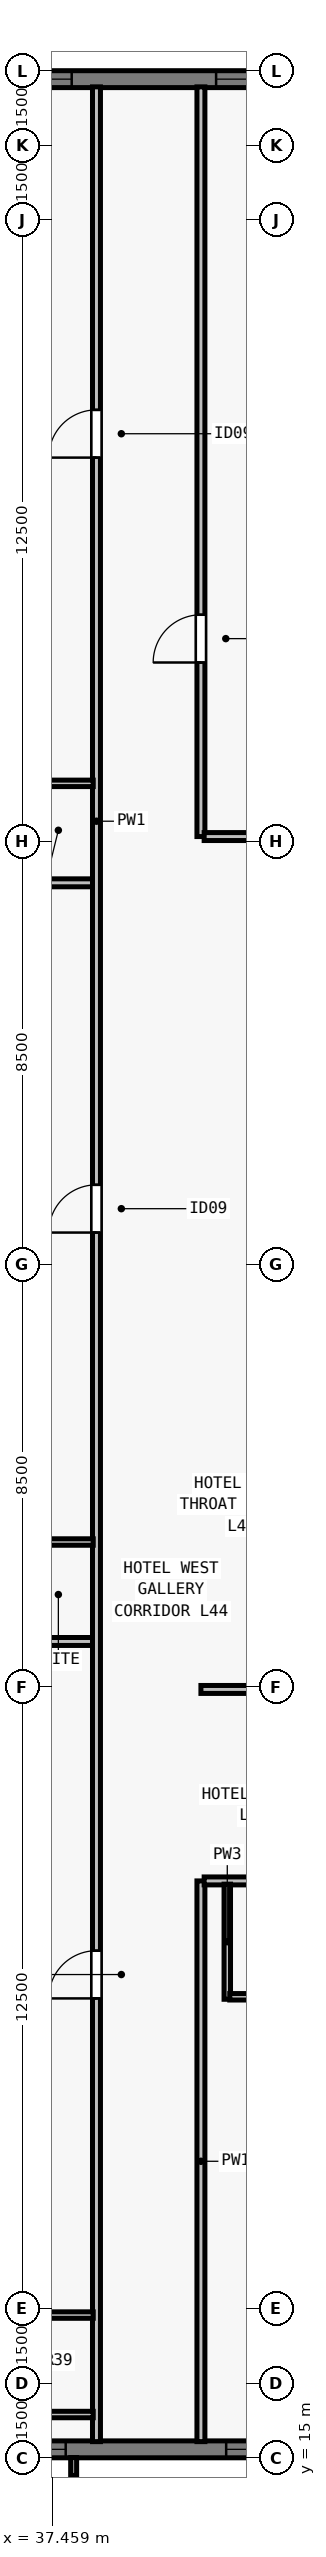
"""IFC4 building model, lengths in metres.
Left out: names, types, materials, properties, quantities, classifications, styles, units other than length and angle.
Written with IfcOpenShell. Run it as: python <this file> out.ifc"""

import sys

from ifc_helpers import new_model, si_unit, direction, frame, frame_2d, origin, place, context, subcontext, project, spatial, rectangle, extrude, element, fill, save


model = new_model("IFC4")
c1 = context("Model", 3, precision=1e-05, world=origin(), true_north=direction((0.0, 1.0)))
c2 = subcontext(c1, "Body", "Model", "MODEL_VIEW")
j1 = project(units=[si_unit("LENGTHUNIT", "METRE"), si_unit("PLANEANGLEUNIT", "RADIAN")], contexts=[c1])
p1 = place(None, origin())
s1 = spatial("IfcSite", under=j1, at=p1, CompositionType="ELEMENT")
p2 = place(p1, origin())
s2 = spatial("IfcBuilding", under=s1, at=p2, CompositionType="ELEMENT")
p3 = place(p2, frame((0.0, 0.0, 162.0)))
s3 = spatial("IfcBuildingStorey", under=s2, at=p3, CompositionType="ELEMENT", Elevation=162.0)
p4 = place(p3, frame((57.4, 15.17, 0.0), z_axis=(0.0, 0.0, 1.0), x_axis=(-1.0, 0.0, 0.0)))
e1 = element("IfcWall", 1, at=p4, inside=s3, PredefinedType="SOLIDWALL", context=c2, shape_type="SweptSolid", body=[
    extrude(rectangle(XDim=25.082, YDim=0.34, at=frame_2d((12.541, 0.0))), origin(), (0.0, 0.0, 1.0), 3.28),
])
p5 = place(p4, frame((4.913, 0.0, 0.8)))
e2 = element("IfcOpeningElement", 2, at=p5, cuts=e1, PredefinedType="OPENING", context=c2, shape_type="SweptSolid", body=[
    extrude(rectangle(XDim=1.35, YDim=1.66, at=frame_2d((0.675, 0.83))), frame((0.0, 0.18, 0.0), z_axis=(0.0, -1.0, 0.0), x_axis=(1.0, 0.0, 0.0)), (0.0, 0.0, 1.0), 0.36),
])
p6 = place(p4, frame((12.716, 0.0, 0.8)))
e3 = element("IfcOpeningElement", 3, at=p6, cuts=e1, PredefinedType="OPENING", context=c2, shape_type="SweptSolid", body=[
    extrude(rectangle(XDim=1.35, YDim=1.66, at=frame_2d((0.675, 0.83))), frame((0.0, 0.18, 0.0), z_axis=(0.0, -1.0, 0.0), x_axis=(1.0, 0.0, 0.0)), (0.0, 0.0, 1.0), 0.36),
])
p7 = place(p4, frame((14.692, 0.0, 0.8)))
e4 = element("IfcOpeningElement", 4, at=p7, cuts=e1, PredefinedType="OPENING", context=c2, shape_type="SweptSolid", body=[
    extrude(rectangle(XDim=1.75, YDim=1.66, at=frame_2d((0.875, 0.83))), frame((0.0, 0.18, 0.0), z_axis=(0.0, -1.0, 0.0), x_axis=(1.0, 0.0, 0.0)), (0.0, 0.0, 1.0), 0.36),
])
p8 = place(p4, frame((19.669, 0.0, 0.8)))
e5 = element("IfcOpeningElement", 5, at=p8, cuts=e1, PredefinedType="OPENING", context=c2, shape_type="SweptSolid", body=[
    extrude(rectangle(XDim=1.35, YDim=1.66, at=frame_2d((0.675, 0.83))), frame((0.0, 0.18, 0.0), z_axis=(0.0, -1.0, 0.0), x_axis=(1.0, 0.0, 0.0)), (0.0, 0.0, 1.0), 0.36),
])
p9 = place(p4, frame((8.71, 0.0, 0.8)))
e6 = element("IfcOpeningElement", 6, at=p9, cuts=e1, PredefinedType="OPENING", context=c2, shape_type="SweptSolid", body=[
    extrude(rectangle(XDim=0.75, YDim=1.66, at=frame_2d((0.375, 0.83))), frame((0.0, 0.18, 0.0), z_axis=(0.0, -1.0, 0.0), x_axis=(1.0, 0.0, 0.0)), (0.0, 0.0, 1.0), 0.36),
])
p10 = place(p4, frame((1.27, 0.0, 0.8)))
e7 = element("IfcOpeningElement", 7, at=p10, cuts=e1, PredefinedType="OPENING", context=c2, shape_type="SweptSolid", body=[
    extrude(rectangle(XDim=0.9, YDim=1.66, at=frame_2d((0.45, 0.83))), frame((0.0, 0.18, 0.0), z_axis=(0.0, -1.0, 0.0), x_axis=(1.0, 0.0, 0.0)), (0.0, 0.0, 1.0), 0.36),
])
p11 = place(p3, frame((32.0, 62.83, 0.0), z_axis=(0.0, 0.0, 1.0), x_axis=(1.0, 0.0, 0.0)))
e8 = element("IfcWall", 8, at=p11, inside=s3, PredefinedType="SOLIDWALL", context=c2, shape_type="SweptSolid", body=[
    extrude(rectangle(XDim=39.682, YDim=0.34, at=frame_2d((19.841, 0.0))), origin(), (0.0, 0.0, 1.0), 3.28),
])
p12 = place(p11, frame((4.502, 0.0, 0.8)))
e9 = element("IfcOpeningElement", 9, at=p12, cuts=e8, PredefinedType="OPENING", context=c2, shape_type="SweptSolid", body=[
    extrude(rectangle(XDim=1.35, YDim=1.66, at=frame_2d((0.675, 0.83))), frame((0.0, 0.18, 0.0), z_axis=(0.0, -1.0, 0.0), x_axis=(1.0, 0.0, 0.0)), (0.0, 0.0, 1.0), 0.36),
])
p13 = place(p11, frame((8.755, 0.0, 0.8)))
e10 = element("IfcOpeningElement", 10, at=p13, cuts=e8, PredefinedType="OPENING", context=c2, shape_type="SweptSolid", body=[
    extrude(rectangle(XDim=1.75, YDim=1.66, at=frame_2d((0.875, 0.83))), frame((0.0, 0.18, 0.0), z_axis=(0.0, -1.0, 0.0), x_axis=(1.0, 0.0, 0.0)), (0.0, 0.0, 1.0), 0.36),
])
p14 = place(p11, frame((12.059, 0.0, 0.8)))
e11 = element("IfcOpeningElement", 11, at=p14, cuts=e8, PredefinedType="OPENING", context=c2, shape_type="SweptSolid", body=[
    extrude(rectangle(XDim=1.35, YDim=1.66, at=frame_2d((0.675, 0.83))), frame((0.0, 0.18, 0.0), z_axis=(0.0, -1.0, 0.0), x_axis=(1.0, 0.0, 0.0)), (0.0, 0.0, 1.0), 0.36),
])
p15 = place(p11, frame((16.262, 0.0, 0.8)))
e12 = element("IfcOpeningElement", 12, at=p15, cuts=e8, PredefinedType="OPENING", context=c2, shape_type="SweptSolid", body=[
    extrude(rectangle(XDim=1.75, YDim=1.66, at=frame_2d((0.875, 0.83))), frame((0.0, 0.18, 0.0), z_axis=(0.0, -1.0, 0.0), x_axis=(1.0, 0.0, 0.0)), (0.0, 0.0, 1.0), 0.36),
])
p16 = place(p11, frame((19.166, 0.0, 0.8)))
e13 = element("IfcOpeningElement", 13, at=p16, cuts=e8, PredefinedType="OPENING", context=c2, shape_type="SweptSolid", body=[
    extrude(rectangle(XDim=1.35, YDim=1.66, at=frame_2d((0.675, 0.83))), frame((0.0, 0.18, 0.0), z_axis=(0.0, -1.0, 0.0), x_axis=(1.0, 0.0, 0.0)), (0.0, 0.0, 1.0), 0.36),
])
p17 = place(p11, frame((22.07, 0.0, 0.8)))
e14 = element("IfcOpeningElement", 14, at=p17, cuts=e8, PredefinedType="OPENING", context=c2, shape_type="SweptSolid", body=[
    extrude(rectangle(XDim=1.75, YDim=1.66, at=frame_2d((0.875, 0.83))), frame((0.0, 0.18, 0.0), z_axis=(0.0, -1.0, 0.0), x_axis=(1.0, 0.0, 0.0)), (0.0, 0.0, 1.0), 0.36),
])
p18 = place(p11, frame((26.273, 0.0, 0.8)))
e15 = element("IfcOpeningElement", 15, at=p18, cuts=e8, PredefinedType="OPENING", context=c2, shape_type="SweptSolid", body=[
    extrude(rectangle(XDim=1.35, YDim=1.66, at=frame_2d((0.675, 0.83))), frame((0.0, 0.18, 0.0), z_axis=(0.0, -1.0, 0.0), x_axis=(1.0, 0.0, 0.0)), (0.0, 0.0, 1.0), 0.36),
])
p19 = place(p11, frame((28.377, 0.0, 0.8)))
e16 = element("IfcOpeningElement", 16, at=p19, cuts=e8, PredefinedType="OPENING", context=c2, shape_type="SweptSolid", body=[
    extrude(rectangle(XDim=1.75, YDim=1.66, at=frame_2d((0.875, 0.83))), frame((0.0, 0.18, 0.0), z_axis=(0.0, -1.0, 0.0), x_axis=(1.0, 0.0, 0.0)), (0.0, 0.0, 1.0), 0.36),
])
p20 = place(p11, frame((33.38, 0.0, 0.8)))
e17 = element("IfcOpeningElement", 17, at=p20, cuts=e8, PredefinedType="OPENING", context=c2, shape_type="SweptSolid", body=[
    extrude(rectangle(XDim=1.35, YDim=1.66, at=frame_2d((0.675, 0.83))), frame((0.0, 0.18, 0.0), z_axis=(0.0, -1.0, 0.0), x_axis=(1.0, 0.0, 0.0)), (0.0, 0.0, 1.0), 0.36),
])
p21 = place(p3, frame((38.35, 15.325, 0.0), z_axis=(0.0, 0.0, 1.0), x_axis=(0.0, 1.0, 0.0)))
e18 = element("IfcWall", 18, at=p21, inside=s3, PredefinedType="PARTITIONING", context=c2, shape_type="SweptSolid", body=[
    extrude(rectangle(XDim=47.35, YDim=0.16, at=frame_2d((23.675, 0.0))), origin(), (0.0, 0.0, 1.0), 2.555),
])
p22 = place(p21, frame((8.912, 0.0, 0.0)))
e19 = element("IfcOpeningElement", 19, at=p22, cuts=e18, PredefinedType="OPENING", context=c2, shape_type="SweptSolid", body=[
    extrude(rectangle(XDim=0.96, YDim=2.15, at=frame_2d((0.48, 1.075))), frame((0.0, 0.09, 0.0), z_axis=(0.0, -1.0, 0.0), x_axis=(1.0, 0.0, 0.0)), (0.0, 0.0, 1.0), 0.18),
])
p23 = place(p21, frame((24.312, 0.0, 0.0)))
e20 = element("IfcOpeningElement", 20, at=p23, cuts=e18, PredefinedType="OPENING", context=c2, shape_type="SweptSolid", body=[
    extrude(rectangle(XDim=0.96, YDim=2.15, at=frame_2d((0.48, 1.075))), frame((0.0, 0.09, 0.0), z_axis=(0.0, -1.0, 0.0), x_axis=(1.0, 0.0, 0.0)), (0.0, 0.0, 1.0), 0.18),
])
p24 = place(p21, frame((39.895, 0.0, 0.0)))
e21 = element("IfcOpeningElement", 21, at=p24, cuts=e18, PredefinedType="OPENING", context=c2, shape_type="SweptSolid", body=[
    extrude(rectangle(XDim=0.96, YDim=2.15, at=frame_2d((0.48, 1.075))), frame((0.0, 0.09, 0.0), z_axis=(0.0, -1.0, 0.0), x_axis=(1.0, 0.0, 0.0)), (0.0, 0.0, 1.0), 0.18),
])
p25 = place(p3, frame((40.45, 15.325, 0.0), z_axis=(0.0, 0.0, 1.0), x_axis=(0.0, 1.0, 0.0)))
e22 = element("IfcWall", 22, at=p25, inside=s3, PredefinedType="PARTITIONING", context=c2, shape_type="SweptSolid", body=[
    extrude(rectangle(XDim=11.275, YDim=0.16, at=frame_2d((5.638, 0.0))), origin(), (0.0, 0.0, 1.0), 2.555),
])
p26 = place(p3, frame((40.45, 47.6, 0.0), z_axis=(0.0, 0.0, 1.0), x_axis=(0.0, 1.0, 0.0)))
e23 = element("IfcWall", 23, at=p26, inside=s3, PredefinedType="PARTITIONING", context=c2, shape_type="SweptSolid", body=[
    extrude(rectangle(XDim=15.075, YDim=0.16, at=frame_2d((7.538, 0.0))), origin(), (0.0, 0.0, 1.0), 2.555),
])
p27 = place(p26, frame((3.5, 0.0, 0.0)))
e24 = element("IfcOpeningElement", 24, at=p27, cuts=e23, PredefinedType="OPENING", context=c2, shape_type="SweptSolid", body=[
    extrude(rectangle(XDim=0.96, YDim=2.12, at=frame_2d((0.48, 1.06))), frame((0.0, 0.09, 0.0), z_axis=(0.0, -1.0, 0.0), x_axis=(1.0, 0.0, 0.0)), (0.0, 0.0, 1.0), 0.18),
])
p28 = place(p3, frame((40.45, 30.45, 0.0), z_axis=(0.0, 0.0, 1.0), x_axis=(1.0, 0.0, 0.0)))
e25 = element("IfcWall", 25, at=p28, inside=s3, PredefinedType="PARTITIONING", context=c2, shape_type="SweptSolid", body=[
    extrude(rectangle(XDim=2.785, YDim=0.16, at=frame_2d((1.393, 0.0))), origin(), (0.0, 0.0, 1.0), 3.28),
])
p29 = place(p3, frame((40.515, 47.6, 0.0), z_axis=(0.0, 0.0, 1.0), x_axis=(1.0, 0.0, 0.0)))
e26 = element("IfcWall", 26, at=p29, inside=s3, PredefinedType="PARTITIONING", context=c2, shape_type="SweptSolid", body=[
    extrude(rectangle(XDim=2.72, YDim=0.16, at=frame_2d((1.36, 0.0))), origin(), (0.0, 0.0, 1.0), 3.28),
])
p30 = place(p3, frame((40.515, 26.6, 0.0), z_axis=(0.0, 0.0, 1.0), x_axis=(1.0, 0.0, 0.0)))
e27 = element("IfcWall", 27, at=p30, inside=s3, PredefinedType="PARTITIONING", context=c2, shape_type="SweptSolid", body=[
    extrude(rectangle(XDim=22.07, YDim=0.16, at=frame_2d((11.035, 0.0))), origin(), (0.0, 0.0, 1.0), 3.28),
])
p31 = place(p30, frame((3.072, 0.0, 0.0)))
e28 = element("IfcOpeningElement", 28, at=p31, cuts=e27, PredefinedType="OPENING", context=c2, shape_type="SweptSolid", body=[
    extrude(rectangle(XDim=0.96, YDim=2.15, at=frame_2d((0.48, 1.075))), frame((0.0, 0.09, 0.0), z_axis=(0.0, -1.0, 0.0), x_axis=(1.0, 0.0, 0.0)), (0.0, 0.0, 1.0), 0.18),
])
p32 = place(p30, frame((5.362, 0.0, 0.0)))
e29 = element("IfcOpeningElement", 29, at=p32, cuts=e27, PredefinedType="OPENING", context=c2, shape_type="SweptSolid", body=[
    extrude(rectangle(XDim=0.96, YDim=2.15, at=frame_2d((0.48, 1.075))), frame((0.0, 0.09, 0.0), z_axis=(0.0, -1.0, 0.0), x_axis=(1.0, 0.0, 0.0)), (0.0, 0.0, 1.0), 0.18),
])
p33 = place(p30, frame((11.566, 0.0, 0.0)))
e30 = element("IfcOpeningElement", 30, at=p33, cuts=e27, PredefinedType="OPENING", context=c2, shape_type="SweptSolid", body=[
    extrude(rectangle(XDim=0.96, YDim=2.15, at=frame_2d((0.48, 1.075))), frame((0.0, 0.09, 0.0), z_axis=(0.0, -1.0, 0.0), x_axis=(1.0, 0.0, 0.0)), (0.0, 0.0, 1.0), 0.18),
])
p34 = place(p30, frame((14.178, 0.0, 0.0)))
e31 = element("IfcOpeningElement", 31, at=p34, cuts=e27, PredefinedType="OPENING", context=c2, shape_type="SweptSolid", body=[
    extrude(rectangle(XDim=0.96, YDim=2.15, at=frame_2d((0.48, 1.075))), frame((0.0, 0.09, 0.0), z_axis=(0.0, -1.0, 0.0), x_axis=(1.0, 0.0, 0.0)), (0.0, 0.0, 1.0), 0.18),
])
p35 = place(p30, frame((20.099, 0.0, 0.0)))
e32 = element("IfcOpeningElement", 32, at=p35, cuts=e27, PredefinedType="OPENING", context=c2, shape_type="SweptSolid", body=[
    extrude(rectangle(XDim=0.96, YDim=2.15, at=frame_2d((0.48, 1.075))), frame((0.0, 0.09, 0.0), z_axis=(0.0, -1.0, 0.0), x_axis=(1.0, 0.0, 0.0)), (0.0, 0.0, 1.0), 0.18),
])
p36 = place(p3, frame((40.98, 24.22, 0.0), z_axis=(0.0, 0.0, 1.0), x_axis=(0.0, 1.0, 0.0)))
e33 = element("IfcWall", 33, at=p36, inside=s3, PredefinedType="PLUMBINGWALL", context=c2, shape_type="SweptSolid", body=[
    extrude(rectangle(XDim=2.315, YDim=0.13, at=frame_2d((1.157, 0.0))), origin(), (0.0, 0.0, 1.0), 3.28),
])
p37 = place(p3, frame((41.03, 24.27, 0.0), z_axis=(0.0, 0.0, 1.0), x_axis=(1.0, 0.0, 0.0)))
e34 = element("IfcWall", 34, at=p37, inside=s3, PredefinedType="PLUMBINGWALL", context=c2, shape_type="SweptSolid", body=[
    extrude(rectangle(XDim=1.542, YDim=0.13, at=frame_2d((0.771, 0.0))), origin(), (0.0, 0.0, 1.0), 3.28),
])
p38 = place(p37, frame((0.361, 0.0, 0.0)))
e35 = element("IfcOpeningElement", 35, at=p38, cuts=e34, PredefinedType="OPENING", context=c2, shape_type="SweptSolid", body=[
    extrude(rectangle(XDim=0.82, YDim=2.1, at=frame_2d((0.41, 1.05))), frame((0.0, 0.075, 0.0), z_axis=(0.0, -1.0, 0.0), x_axis=(1.0, 0.0, 0.0)), (0.0, 0.0, 1.0), 0.15),
])
for number, where, z_axis, x_axis in (
    (36, (35.97, 15.87, 0.0), (0.0, 0.0, 1.0), (1.0, 0.0, 0.0)),
    (37, (35.97, 17.87, 0.0), (0.0, 0.0, 1.0), (1.0, 0.0, 0.0)),
):
    element("IfcWall", number, at=place(p3, frame(where, z_axis=z_axis, x_axis=x_axis)), inside=s3, PredefinedType="PLUMBINGWALL", context=c2, shape_type="SweptSolid", body=[
        extrude(rectangle(XDim=2.315, YDim=0.13, at=frame_2d((1.157, 0.0))), origin(), (0.0, 0.0, 1.0), 3.28),
    ])
p39 = place(p3, frame((28.325, 31.415, 0.0), z_axis=(0.0, 0.0, 1.0), x_axis=(1.0, 0.0, 0.0)))
e38 = element("IfcWall", 38, at=p39, inside=s3, PredefinedType="PARTITIONING", context=c2, shape_type="SweptSolid", body=[
    extrude(rectangle(XDim=9.945, YDim=0.16, at=frame_2d((4.973, 0.0))), origin(), (0.0, 0.0, 1.0), 3.28),
])
p40 = place(p3, frame((35.97, 33.415, 0.0), z_axis=(0.0, 0.0, 1.0), x_axis=(1.0, 0.0, 0.0)))
e39 = element("IfcWall", 39, at=p40, inside=s3, PredefinedType="PLUMBINGWALL", context=c2, shape_type="SweptSolid", body=[
    extrude(rectangle(XDim=2.315, YDim=0.13, at=frame_2d((1.157, 0.0))), origin(), (0.0, 0.0, 1.0), 3.28),
])
p41 = place(p3, frame((28.325, 46.67, 0.0), z_axis=(0.0, 0.0, 1.0), x_axis=(1.0, 0.0, 0.0)))
e40 = element("IfcWall", 40, at=p41, inside=s3, PredefinedType="PARTITIONING", context=c2, shape_type="SweptSolid", body=[
    extrude(rectangle(XDim=9.945, YDim=0.16, at=frame_2d((4.973, 0.0))), origin(), (0.0, 0.0, 1.0), 3.28),
])
p42 = place(p3, frame((35.97, 48.67, 0.0), z_axis=(0.0, 0.0, 1.0), x_axis=(1.0, 0.0, 0.0)))
e41 = element("IfcWall", 41, at=p42, inside=s3, PredefinedType="PLUMBINGWALL", context=c2, shape_type="SweptSolid", body=[
    extrude(rectangle(XDim=2.315, YDim=0.13, at=frame_2d((1.157, 0.0))), origin(), (0.0, 0.0, 1.0), 3.28),
])
p43 = place(p7, origin())
e42 = element("IfcWindow", 42, at=p43, inside=s3, PartitioningType="SINGLE_PANEL", PredefinedType="WINDOW", context=c2, shape_type="SweptSolid", body=[
    extrude(rectangle(XDim=1.75, YDim=1.66, at=frame_2d((0.875, 0.83))), frame((0.0, -0.05, 0.0), z_axis=(0.0, -1.0, 0.0), x_axis=(1.0, 0.0, 0.0)), (0.0, 0.0, 1.0), 0.06),
])
fill(e4, e42)
p44 = place(p8, origin())
e43 = element("IfcWindow", 43, at=p44, inside=s3, PartitioningType="SINGLE_PANEL", PredefinedType="WINDOW", context=c2, shape_type="SweptSolid", body=[
    extrude(rectangle(XDim=1.35, YDim=1.66, at=frame_2d((0.675, 0.83))), frame((0.0, -0.05, 0.0), z_axis=(0.0, -1.0, 0.0), x_axis=(1.0, 0.0, 0.0)), (0.0, 0.0, 1.0), 0.06),
])
fill(e5, e43)
p45 = place(p12, origin())
e44 = element("IfcWindow", 44, at=p45, inside=s3, PartitioningType="SINGLE_PANEL", PredefinedType="WINDOW", context=c2, shape_type="SweptSolid", body=[
    extrude(rectangle(XDim=1.35, YDim=1.66, at=frame_2d((0.675, 0.83))), frame((0.0, -0.05, 0.0), z_axis=(0.0, -1.0, 0.0), x_axis=(1.0, 0.0, 0.0)), (0.0, 0.0, 1.0), 0.06),
])
fill(e9, e44)
p46 = place(p13, origin())
e45 = element("IfcWindow", 45, at=p46, inside=s3, PartitioningType="SINGLE_PANEL", PredefinedType="WINDOW", context=c2, shape_type="SweptSolid", body=[
    extrude(rectangle(XDim=1.75, YDim=1.66, at=frame_2d((0.875, 0.83))), frame((0.0, -0.05, 0.0), z_axis=(0.0, -1.0, 0.0), x_axis=(1.0, 0.0, 0.0)), (0.0, 0.0, 1.0), 0.06),
])
fill(e10, e45)
p47 = place(p27, origin())
e46 = element("IfcDoor", 46, at=p47, inside=s3, OperationType="SINGLE_SWING_LEFT", PredefinedType="DOOR", context=c2, shape_type="SweptSolid", body=[
    extrude(rectangle(XDim=0.96, YDim=2.12, at=frame_2d((0.48, 1.06))), frame((0.0, 0.025, 0.0), z_axis=(0.0, -1.0, 0.0), x_axis=(1.0, 0.0, 0.0)), (0.0, 0.0, 1.0), 0.05),
])
fill(e24, e46)
p48 = place(p22, origin())
e47 = element("IfcDoor", 47, at=p48, inside=s3, OperationType="SINGLE_SWING_LEFT", PredefinedType="DOOR", context=c2, shape_type="SweptSolid", body=[
    extrude(rectangle(XDim=0.96, YDim=2.15, at=frame_2d((0.48, 1.075))), frame((0.0, 0.025, 0.0), z_axis=(0.0, -1.0, 0.0), x_axis=(1.0, 0.0, 0.0)), (0.0, 0.0, 1.0), 0.05),
])
fill(e19, e47)
p49 = place(p23, origin())
e48 = element("IfcDoor", 48, at=p49, inside=s3, OperationType="SINGLE_SWING_LEFT", PredefinedType="DOOR", context=c2, shape_type="SweptSolid", body=[
    extrude(rectangle(XDim=0.96, YDim=2.15, at=frame_2d((0.48, 1.075))), frame((0.0, 0.025, 0.0), z_axis=(0.0, -1.0, 0.0), x_axis=(1.0, 0.0, 0.0)), (0.0, 0.0, 1.0), 0.05),
])
fill(e20, e48)
p50 = place(p24, origin())
e49 = element("IfcDoor", 49, at=p50, inside=s3, OperationType="SINGLE_SWING_LEFT", PredefinedType="DOOR", context=c2, shape_type="SweptSolid", body=[
    extrude(rectangle(XDim=0.96, YDim=2.15, at=frame_2d((0.48, 1.075))), frame((0.0, 0.025, 0.0), z_axis=(0.0, -1.0, 0.0), x_axis=(1.0, 0.0, 0.0)), (0.0, 0.0, 1.0), 0.05),
])
fill(e21, e49)
save(model, sys.argv[1])
